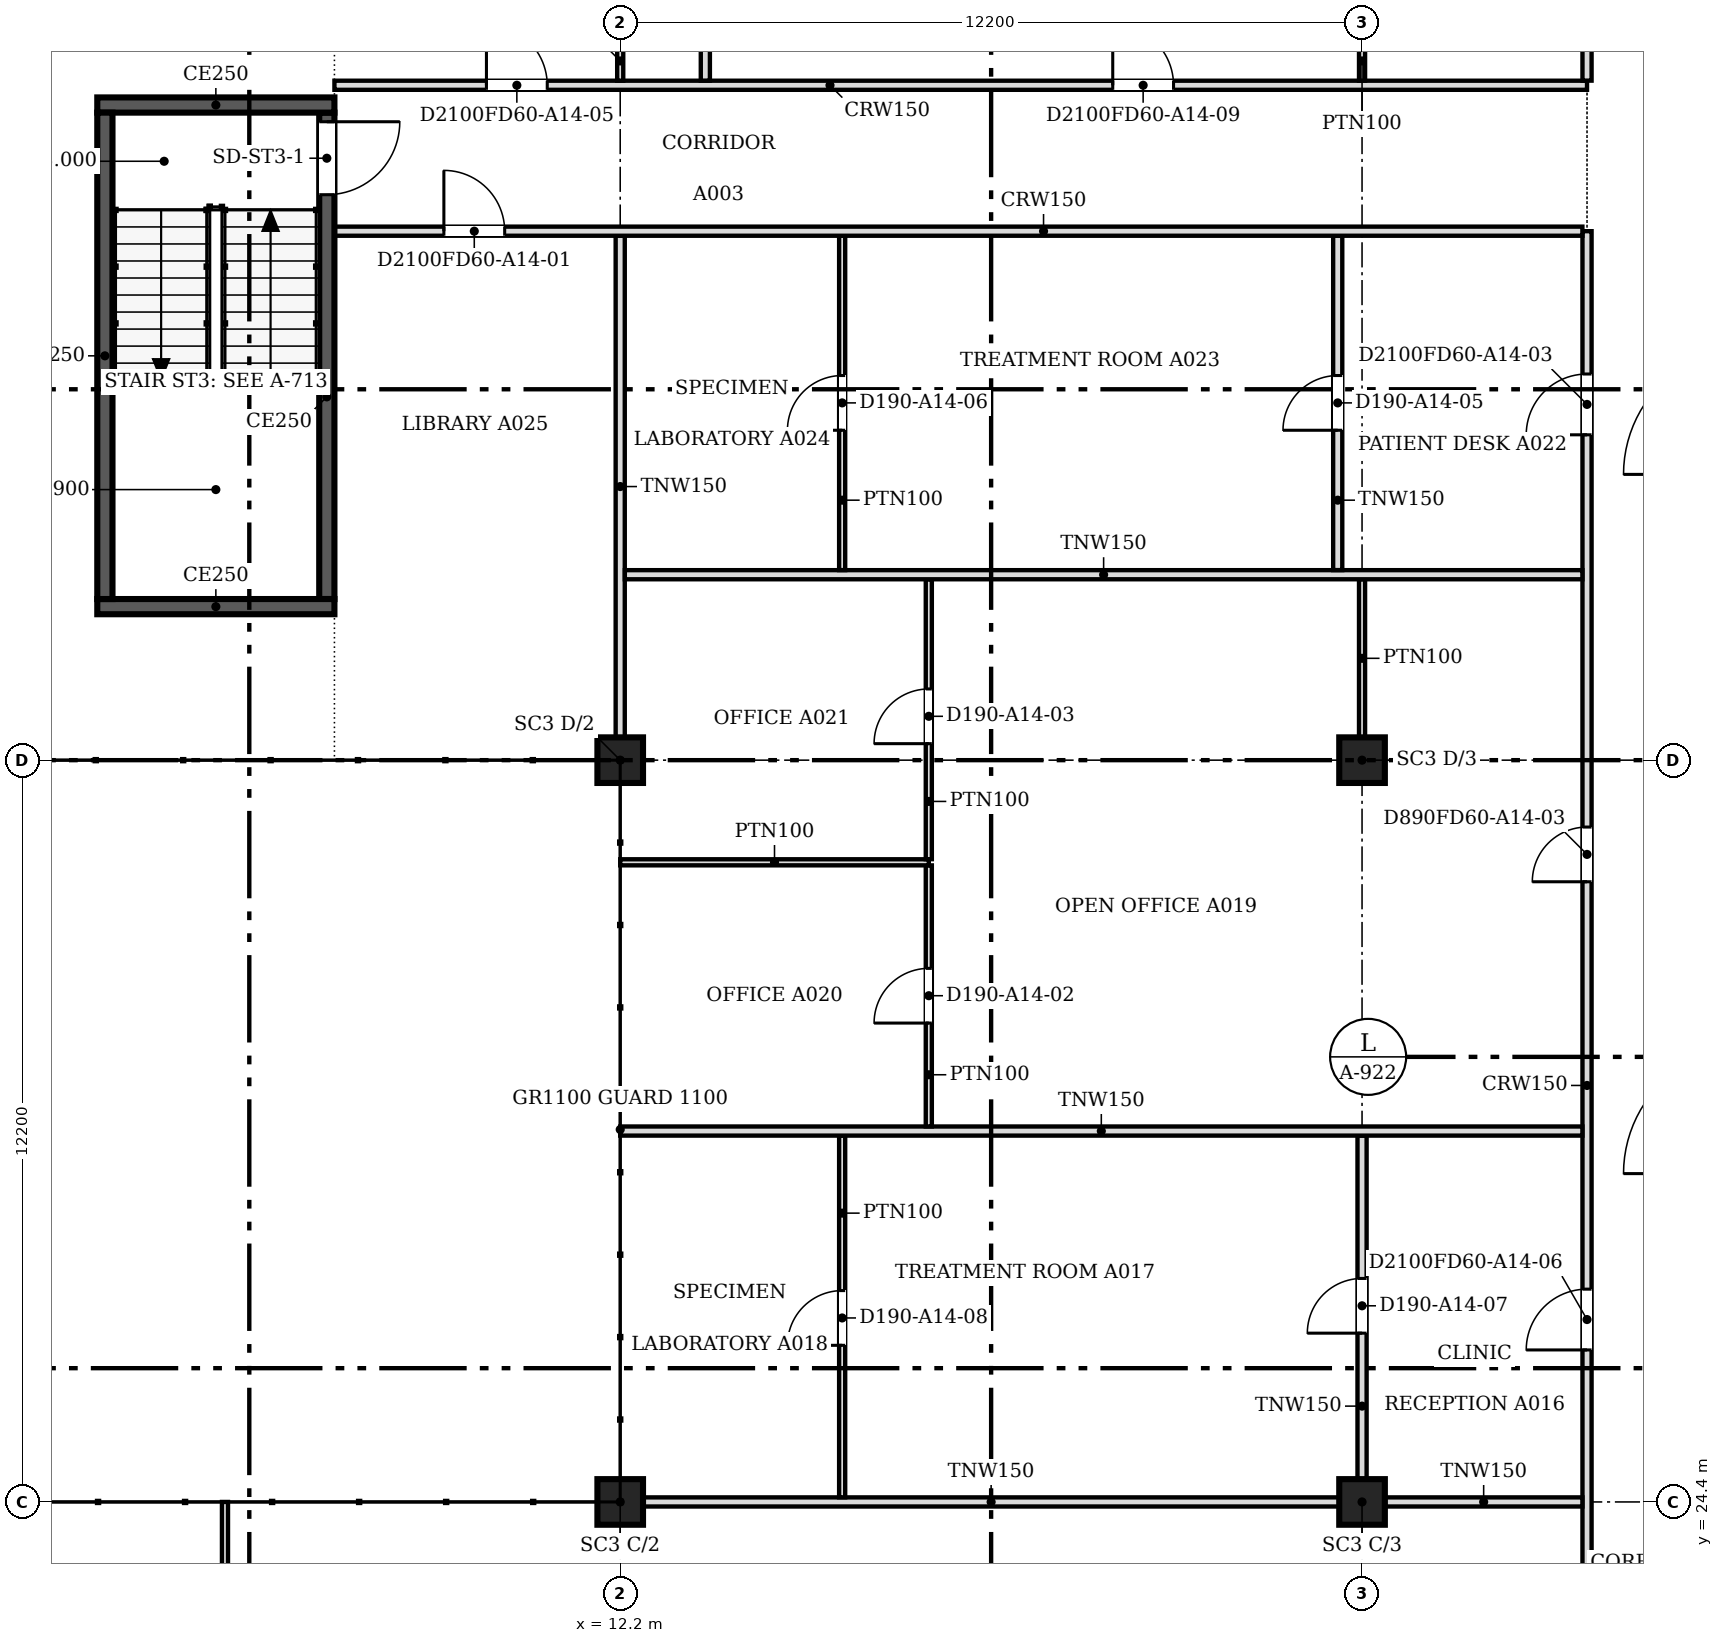
"""IFC4 building model, lengths in metres.
Left out: names, types, materials, properties, quantities, classifications, styles, units other than length and angle.
Written with IfcOpenShell. Run it as: python <this file> out.ifc"""

import sys

from ifc_helpers import new_model, si_unit, direction, frame, frame_2d, origin, origin_2d, place, context, subcontext, project, spatial, rectangle, extrude, source, transform, mapped, element, fill, save


model = new_model("IFC4")
c1 = context("Model", 3, precision=1e-05, world=origin(), true_north=direction((0.0, 1.0)))
c2 = subcontext(c1, "Body", "Model", "MODEL_VIEW")
j1 = project(units=[si_unit("LENGTHUNIT", "METRE"), si_unit("PLANEANGLEUNIT", "RADIAN")], contexts=[c1])
p1 = place(None, origin())
s1 = spatial("IfcSite", under=j1, at=p1, CompositionType="ELEMENT")
p2 = place(p1, origin())
s2 = spatial("IfcBuilding", under=s1, at=p2, CompositionType="ELEMENT")
p3 = place(p2, frame((0.0, 0.0, 159.2)))
s3 = spatial("IfcBuildingStorey", under=s2, at=p3, CompositionType="ELEMENT", Elevation=159.2)
for number, where, z_axis, x_axis in (
    (1, (12.2, 24.4, 0.0), (0.0, 0.0, 1.0), (1.0, 0.0, 0.0)),
    (2, (12.2, 36.6, 0.0), (0.0, 0.0, 1.0), (1.0, 0.0, 0.0)),
    (3, (24.4, 24.4, 0.0), (0.0, 0.0, 1.0), (1.0, 0.0, 0.0)),
    (4, (24.4, 36.6, 0.0), (0.0, 0.0, 1.0), (1.0, 0.0, 0.0)),
):
    element("IfcColumn", number, at=place(p3, frame(where, z_axis=z_axis, x_axis=x_axis)), inside=s3, PredefinedType="COLUMN", context=c2, shape_type="SweptSolid", body=[
        extrude(rectangle(XDim=0.75, YDim=0.75, at=origin_2d()), origin(), (0.0, 0.0, 1.0), 3.6),
    ])
p4 = place(p3, frame((7.5, 39.125, 0.0), z_axis=(0.0, 0.0, 1.0), x_axis=(-1.0, 0.0, 0.0)))
e5 = element("IfcWall", 5, at=p4, inside=s3, PredefinedType="SOLIDWALL", context=c2, shape_type="SweptSolid", body=[
    extrude(rectangle(XDim=3.9, YDim=0.25, at=frame_2d((1.95, 0.0))), origin(), (0.0, 0.0, 1.0), 3.8),
])
p5 = place(p3, frame((3.725, 39.25, 0.0), z_axis=(0.0, 0.0, 1.0), x_axis=(0.0, 1.0, 0.0)))
e6 = element("IfcWall", 6, at=p5, inside=s3, PredefinedType="SOLIDWALL", context=c2, shape_type="SweptSolid", body=[
    extrude(rectangle(XDim=8.0, YDim=0.25, at=frame_2d((4.0, 0.0))), origin(), (0.0, 0.0, 1.0), 3.8),
])
p6 = place(p3, frame((3.6, 47.375, 0.0), z_axis=(0.0, 0.0, 1.0), x_axis=(1.0, 0.0, 0.0)))
e7 = element("IfcWall", 7, at=p6, inside=s3, PredefinedType="SOLIDWALL", context=c2, shape_type="SweptSolid", body=[
    extrude(rectangle(XDim=3.9, YDim=0.25, at=frame_2d((1.95, 0.0))), origin(), (0.0, 0.0, 1.0), 3.8),
])
p7 = place(p3, frame((7.375, 47.25, 0.0), z_axis=(0.0, 0.0, 1.0), x_axis=(0.0, -1.0, 0.0)))
e8 = element("IfcWall", 8, at=p7, inside=s3, PredefinedType="SOLIDWALL", context=c2, shape_type="SweptSolid", body=[
    extrude(rectangle(XDim=8.0, YDim=0.25, at=frame_2d((4.0, 0.0))), origin(), (0.0, 0.0, 1.0), 3.8),
])
m1 = source(origin(), c2, "Body", "SweptSolid", [
    extrude(rectangle(XDim=1.2, YDim=2.1, at=frame_2d((0.6, 1.05))), frame((0.0, 0.135, 0.0), z_axis=(0.0, -1.0, 0.0), x_axis=(1.0, 0.0, 0.0)), (0.0, 0.0, 1.0), 0.27),
])
p8 = place(p7, frame((0.15, 0.0, 0.0)))
e9 = element("IfcOpeningElement", 9, at=p8, cuts=e8, PredefinedType="OPENING", context=c2, shape_type="MappedRepresentation", body=[
    mapped(m1, transform((0.0, 0.0, 0.0), scale=1.0)),
])
p9 = place(p3, frame((28.1, 18.8, 0.0), z_axis=(0.0, 0.0, 1.0), x_axis=(0.0, 1.0, 0.0)))
e10 = element("IfcWall", 10, at=p9, inside=s3, PredefinedType="PARTITIONING", context=c2, shape_type="SweptSolid", body=[
    extrude(rectangle(XDim=26.5, YDim=0.15, at=frame_2d((13.25, 0.0))), origin(), (0.0, 0.0, 1.0), 3.067),
])
m2 = source(origin(), c2, "Body", "SweptSolid", [
    extrude(rectangle(XDim=0.9, YDim=2.1, at=frame_2d((0.45, 1.05))), frame((0.0, 0.085, 0.0), z_axis=(0.0, -1.0, 0.0), x_axis=(1.0, 0.0, 0.0)), (0.0, 0.0, 1.0), 0.17),
])
p10 = place(p9, frame((1.1, 0.0, 0.0)))
e11 = element("IfcOpeningElement", 11, at=p10, cuts=e10, PredefinedType="OPENING", context=c2, shape_type="MappedRepresentation", body=[
    mapped(m2, transform((0.0, 0.0, 0.0), scale=1.0)),
])
m3 = source(origin(), c2, "Body", "SweptSolid", [
    extrude(rectangle(XDim=1.0, YDim=2.1, at=frame_2d((0.5, 1.05))), frame((0.0, 0.085, 0.0), z_axis=(0.0, -1.0, 0.0), x_axis=(1.0, 0.0, 0.0)), (0.0, 0.0, 1.0), 0.17),
])
p11 = place(p9, frame((23.151, 0.0, 0.0)))
e12 = element("IfcOpeningElement", 12, at=p11, cuts=e10, PredefinedType="OPENING", context=c2, shape_type="MappedRepresentation", body=[
    mapped(m3, transform((0.0, 0.0, 0.0), scale=1.0)),
])
p12 = place(p9, frame((8.1, 0.0, 0.0)))
e13 = element("IfcOpeningElement", 13, at=p12, cuts=e10, PredefinedType="OPENING", context=c2, shape_type="MappedRepresentation", body=[
    mapped(m3, transform((0.0, 0.0, 0.0), scale=1.0)),
])
p13 = place(p9, frame((15.8, 0.0, 0.0)))
e14 = element("IfcOpeningElement", 14, at=p13, cuts=e10, PredefinedType="OPENING", context=c2, shape_type="MappedRepresentation", body=[
    mapped(m2, transform((0.0, 0.0, 0.0), scale=1.0)),
])
p14 = place(p3, frame((5.7, 18.99, 0.0), z_axis=(0.0, 0.0, 1.0), x_axis=(0.0, 1.0, 0.0)))
e15 = element("IfcWall", 15, at=p14, inside=s3, PredefinedType="PARTITIONING", context=c2, shape_type="SweptSolid", body=[
    extrude(rectangle(XDim=5.41, YDim=0.1, at=frame_2d((2.705, 0.0))), origin(), (0.0, 0.0, 1.0), 3.067),
])
m4 = source(origin(), c2, "Body", "SweptSolid", [
    extrude(rectangle(XDim=0.9, YDim=2.1, at=frame_2d((0.45, 1.05))), frame((0.0, 0.06, 0.0), z_axis=(0.0, -1.0, 0.0), x_axis=(1.0, 0.0, 0.0)), (0.0, 0.0, 1.0), 0.12),
])
p15 = place(p14, frame((2.3, 0.0, 0.0)))
e16 = element("IfcOpeningElement", 16, at=p15, cuts=e15, PredefinedType="OPENING", context=c2, shape_type="MappedRepresentation", body=[
    mapped(m4, transform((0.0, 0.0, 0.0), scale=1.0)),
])
p16 = place(p3, frame((12.576, 24.4, 0.0), z_axis=(0.0, 0.0, 1.0), x_axis=(1.0, 0.0, 0.0)))
e17 = element("IfcWall", 17, at=p16, inside=s3, PredefinedType="PARTITIONING", context=c2, shape_type="SweptSolid", body=[
    extrude(rectangle(XDim=11.448, YDim=0.15, at=frame_2d((5.724, 0.0))), origin(), (0.0, 0.0, 1.0), 3.067),
])
p17 = place(p3, frame((24.776, 24.4, 0.0), z_axis=(0.0, 0.0, 1.0), x_axis=(1.0, 0.0, 0.0)))
e18 = element("IfcWall", 18, at=p17, inside=s3, PredefinedType="PARTITIONING", context=c2, shape_type="SweptSolid", body=[
    extrude(rectangle(XDim=3.248, YDim=0.15, at=frame_2d((1.624, 0.0))), origin(), (0.0, 0.0, 1.0), 3.067),
])
p18 = place(p3, frame((15.85, 24.476, 0.0), z_axis=(0.0, 0.0, 1.0), x_axis=(0.0, 1.0, 0.0)))
e19 = element("IfcWall", 19, at=p18, inside=s3, PredefinedType="PARTITIONING", context=c2, shape_type="SweptSolid", body=[
    extrude(rectangle(XDim=5.948, YDim=0.1, at=frame_2d((2.974, 0.0))), origin(), (0.0, 0.0, 1.0), 3.067),
])
p19 = place(p18, frame((2.5, 0.0, 0.0)))
e20 = element("IfcOpeningElement", 20, at=p19, cuts=e19, PredefinedType="OPENING", context=c2, shape_type="MappedRepresentation", body=[
    mapped(m4, transform((0.0, 0.0, 0.0), scale=1.0)),
])
p20 = place(p3, frame((24.4, 24.776, 0.0), z_axis=(0.0, 0.0, 1.0), x_axis=(0.0, 1.0, 0.0)))
e21 = element("IfcWall", 21, at=p20, inside=s3, PredefinedType="PARTITIONING", context=c2, shape_type="SweptSolid", body=[
    extrude(rectangle(XDim=5.648, YDim=0.15, at=frame_2d((2.824, 0.0))), origin(), (0.0, 0.0, 1.0), 3.067),
])
p21 = place(p20, frame((2.4, 0.0, 0.0)))
e22 = element("IfcOpeningElement", 22, at=p21, cuts=e21, PredefinedType="OPENING", context=c2, shape_type="MappedRepresentation", body=[
    mapped(m2, transform((0.0, 0.0, 0.0), scale=1.0)),
])
p22 = place(p3, frame((12.2, 30.5, 0.0), z_axis=(0.0, 0.0, 1.0), x_axis=(1.0, 0.0, 0.0)))
e23 = element("IfcWall", 23, at=p22, inside=s3, PredefinedType="PARTITIONING", context=c2, shape_type="SweptSolid", body=[
    extrude(rectangle(XDim=15.824, YDim=0.15, at=frame_2d((7.912, 0.0))), origin(), (0.0, 0.0, 1.0), 3.067),
])
p23 = place(p3, frame((17.275, 30.576, 0.0), z_axis=(0.0, 0.0, 1.0), x_axis=(0.0, 1.0, 0.0)))
e24 = element("IfcWall", 24, at=p23, inside=s3, PredefinedType="PARTITIONING", context=c2, shape_type="SweptSolid", body=[
    extrude(rectangle(XDim=4.293, YDim=0.1, at=frame_2d((2.147, 0.0))), origin(), (0.0, 0.0, 1.0), 3.067),
])
p24 = place(p23, frame((1.7, 0.0, 0.0)))
e25 = element("IfcOpeningElement", 25, at=p24, cuts=e24, PredefinedType="OPENING", context=c2, shape_type="MappedRepresentation", body=[
    mapped(m4, transform((0.0, 0.0, 0.0), scale=1.0)),
])
p25 = place(p3, frame((12.2, 34.92, 0.0), z_axis=(0.0, 0.0, 1.0), x_axis=(1.0, 0.0, 0.0)))
e26 = element("IfcWall", 26, at=p25, inside=s3, PredefinedType="PARTITIONING", context=c2, shape_type="SweptSolid", body=[
    extrude(rectangle(XDim=5.075, YDim=0.1, at=frame_2d((2.538, 0.0))), origin(), (0.0, 0.0, 1.0), 3.067),
])
p26 = place(p3, frame((17.275, 34.971, 0.0), z_axis=(0.0, 0.0, 1.0), x_axis=(0.0, 1.0, 0.0)))
e27 = element("IfcWall", 27, at=p26, inside=s3, PredefinedType="PARTITIONING", context=c2, shape_type="SweptSolid", body=[
    extrude(rectangle(XDim=4.603, YDim=0.1, at=frame_2d((2.301, 0.0))), origin(), (0.0, 0.0, 1.0), 3.067),
])
p27 = place(p26, frame((1.9, 0.0, 0.0)))
e28 = element("IfcOpeningElement", 28, at=p27, cuts=e27, PredefinedType="OPENING", context=c2, shape_type="MappedRepresentation", body=[
    mapped(m4, transform((0.0, 0.0, 0.0), scale=1.0)),
])
p28 = place(p3, frame((12.2, 36.976, 0.0), z_axis=(0.0, 0.0, 1.0), x_axis=(0.0, 1.0, 0.0)))
e29 = element("IfcWall", 29, at=p28, inside=s3, PredefinedType="PARTITIONING", context=c2, shape_type="SweptSolid", body=[
    extrude(rectangle(XDim=8.248, YDim=0.15, at=frame_2d((4.124, 0.0))), origin(), (0.0, 0.0, 1.0), 3.067),
])
p29 = place(p3, frame((24.4, 36.975, 0.0), z_axis=(0.0, 0.0, 1.0), x_axis=(0.0, 1.0, 0.0)))
e30 = element("IfcWall", 30, at=p29, inside=s3, PredefinedType="PARTITIONING", context=c2, shape_type="SweptSolid", body=[
    extrude(rectangle(XDim=2.6, YDim=0.1, at=frame_2d((1.3, 0.0))), origin(), (0.0, 0.0, 1.0), 3.067),
])
p30 = place(p3, frame((12.276, 39.65, 0.0), z_axis=(0.0, 0.0, 1.0), x_axis=(1.0, 0.0, 0.0)))
e31 = element("IfcWall", 31, at=p30, inside=s3, PredefinedType="PARTITIONING", context=c2, shape_type="SweptSolid", body=[
    extrude(rectangle(XDim=15.748, YDim=0.15, at=frame_2d((7.874, 0.0))), origin(), (0.0, 0.0, 1.0), 3.067),
])
p31 = place(p3, frame((15.85, 39.726, 0.0), z_axis=(0.0, 0.0, 1.0), x_axis=(0.0, 1.0, 0.0)))
e32 = element("IfcWall", 32, at=p31, inside=s3, PredefinedType="PARTITIONING", context=c2, shape_type="SweptSolid", body=[
    extrude(rectangle(XDim=5.498, YDim=0.1, at=frame_2d((2.749, 0.0))), origin(), (0.0, 0.0, 1.0), 3.067),
])
p32 = place(p31, frame((2.3, 0.0, 0.0)))
e33 = element("IfcOpeningElement", 33, at=p32, cuts=e32, PredefinedType="OPENING", context=c2, shape_type="MappedRepresentation", body=[
    mapped(m4, transform((0.0, 0.0, 0.0), scale=1.0)),
])
p33 = place(p3, frame((24.0, 39.726, 0.0), z_axis=(0.0, 0.0, 1.0), x_axis=(0.0, 1.0, 0.0)))
e34 = element("IfcWall", 34, at=p33, inside=s3, PredefinedType="PARTITIONING", context=c2, shape_type="SweptSolid", body=[
    extrude(rectangle(XDim=5.498, YDim=0.15, at=frame_2d((2.749, 0.0))), origin(), (0.0, 0.0, 1.0), 3.067),
])
p34 = place(p33, frame((2.3, 0.0, 0.0)))
e35 = element("IfcOpeningElement", 35, at=p34, cuts=e34, PredefinedType="OPENING", context=c2, shape_type="MappedRepresentation", body=[
    mapped(m2, transform((0.0, 0.0, 0.0), scale=1.0)),
])
p35 = place(p3, frame((28.024, 45.3, 0.0), z_axis=(0.0, 0.0, 1.0), x_axis=(-1.0, 0.0, 0.0)))
e36 = element("IfcWall", 36, at=p35, inside=s3, PredefinedType="PARTITIONING", context=c2, shape_type="SweptSolid", body=[
    extrude(rectangle(XDim=20.524, YDim=0.15, at=frame_2d((10.262, 0.0))), origin(), (0.0, 0.0, 1.0), 3.067),
])
p36 = place(p35, frame((17.724, 0.0, 0.0)))
e37 = element("IfcOpeningElement", 37, at=p36, cuts=e36, PredefinedType="OPENING", context=c2, shape_type="MappedRepresentation", body=[
    mapped(m3, transform((0.0, 0.0, 0.0), scale=1.0)),
])
p37 = place(p3, frame((7.5, 47.7, 0.0), z_axis=(0.0, 0.0, 1.0), x_axis=(1.0, 0.0, 0.0)))
e38 = element("IfcWall", 38, at=p37, inside=s3, PredefinedType="PARTITIONING", context=c2, shape_type="SweptSolid", body=[
    extrude(rectangle(XDim=20.6, YDim=0.15, at=frame_2d((10.3, 0.0))), origin(), (0.0, 0.0, 1.0), 3.067),
])
p38 = place(p37, frame((2.5, 0.0, 0.0)))
e39 = element("IfcOpeningElement", 39, at=p38, cuts=e38, PredefinedType="OPENING", context=c2, shape_type="MappedRepresentation", body=[
    mapped(m3, transform((0.0, 0.0, 0.0), scale=1.0)),
])
p39 = place(p37, frame((12.8, 0.0, 0.0)))
e40 = element("IfcOpeningElement", 40, at=p39, cuts=e38, PredefinedType="OPENING", context=c2, shape_type="MappedRepresentation", body=[
    mapped(m3, transform((0.0, 0.0, 0.0), scale=1.0)),
])
p40 = place(p3, frame((13.6, 47.776, 0.0), z_axis=(0.0, 0.0, 1.0), x_axis=(0.0, 1.0, 0.0)))
e41 = element("IfcWall", 41, at=p40, inside=s3, PredefinedType="PARTITIONING", context=c2, shape_type="SweptSolid", body=[
    extrude(rectangle(XDim=3.248, YDim=0.15, at=frame_2d((1.624, 0.0))), origin(), (0.0, 0.0, 1.0), 3.067),
])
p41 = place(p3, frame((28.1, 47.776, 0.0), z_axis=(0.0, 0.0, 1.0), x_axis=(0.0, 1.0, 0.0)))
e42 = element("IfcWall", 42, at=p41, inside=s3, PredefinedType="PARTITIONING", context=c2, shape_type="SweptSolid", body=[
    extrude(rectangle(XDim=3.324, YDim=0.15, at=frame_2d((1.662, 0.0))), origin(), (0.0, 0.0, 1.0), 3.067),
])
for number, where, z_axis, x_axis in (
    (43, (12.2, 48.425, 0.0), (0.0, 0.0, 1.0), (0.0, -1.0, 0.0)),
    (44, (24.4, 48.425, 0.0), (0.0, 0.0, 1.0), (0.0, -1.0, 0.0)),
):
    element("IfcWall", number, at=place(p3, frame(where, z_axis=z_axis, x_axis=x_axis)), inside=s3, PredefinedType="PARTITIONING", context=c2, shape_type="SweptSolid", body=[
        extrude(rectangle(XDim=0.65, YDim=0.1, at=frame_2d((0.325, 0.0))), origin(), (0.0, 0.0, 1.0), 3.067),
    ])
m5 = source(origin(), c2, "Body", "SweptSolid", [
    extrude(rectangle(XDim=1.2, YDim=2.1, at=frame_2d((0.6, 1.05))), frame((0.0, 0.025, 0.0), z_axis=(0.0, -1.0, 0.0), x_axis=(1.0, 0.0, 0.0)), (0.0, 0.0, 1.0), 0.05),
])
p42 = place(p8, origin())
e45 = element("IfcDoor", 45, at=p42, inside=s3, OperationType="SINGLE_SWING_LEFT", PredefinedType="DOOR", context=c2, shape_type="MappedRepresentation", body=[
    mapped(m5, transform((0.0, 0.0, 0.0), scale=1.0)),
])
fill(e9, e45)
m6 = source(origin(), c2, "Body", "SweptSolid", [
    extrude(rectangle(XDim=0.9, YDim=2.1, at=frame_2d((0.45, 1.05))), frame((0.0, 0.025, 0.0), z_axis=(0.0, -1.0, 0.0), x_axis=(1.0, 0.0, 0.0)), (0.0, 0.0, 1.0), 0.05),
])
p43 = place(p24, origin())
e46 = element("IfcDoor", 46, at=p43, inside=s3, OperationType="SINGLE_SWING_LEFT", PredefinedType="DOOR", context=c2, shape_type="MappedRepresentation", body=[
    mapped(m6, transform((0.0, 0.0, 0.0), scale=1.0)),
])
fill(e25, e46)
p44 = place(p27, origin())
e47 = element("IfcDoor", 47, at=p44, inside=s3, OperationType="SINGLE_SWING_LEFT", PredefinedType="DOOR", context=c2, shape_type="MappedRepresentation", body=[
    mapped(m6, transform((0.0, 0.0, 0.0), scale=1.0)),
])
fill(e28, e47)
m7 = source(origin(), c2, "Body", "SweptSolid", [
    extrude(rectangle(XDim=1.0, YDim=2.1, at=frame_2d((0.5, 1.05))), frame((0.0, 0.025, 0.0), z_axis=(0.0, -1.0, 0.0), x_axis=(1.0, 0.0, 0.0)), (0.0, 0.0, 1.0), 0.05),
])
p45 = place(p36, origin())
e48 = element("IfcDoor", 48, at=p45, inside=s3, OperationType="SINGLE_SWING_RIGHT", PredefinedType="DOOR", context=c2, shape_type="MappedRepresentation", body=[
    mapped(m7, transform((0.0, 0.0, 0.0), scale=1.0)),
])
fill(e37, e48)
p46 = place(p34, origin())
e49 = element("IfcDoor", 49, at=p46, inside=s3, OperationType="SINGLE_SWING_LEFT", PredefinedType="DOOR", context=c2, shape_type="MappedRepresentation", body=[
    mapped(m6, transform((0.0, 0.0, 0.0), scale=1.0)),
])
fill(e35, e49)
p47 = place(p32, origin())
e50 = element("IfcDoor", 50, at=p47, inside=s3, OperationType="SINGLE_SWING_LEFT", PredefinedType="DOOR", context=c2, shape_type="MappedRepresentation", body=[
    mapped(m6, transform((0.0, 0.0, 0.0), scale=1.0)),
])
fill(e33, e50)
p48 = place(p21, origin())
e51 = element("IfcDoor", 51, at=p48, inside=s3, OperationType="SINGLE_SWING_LEFT", PredefinedType="DOOR", context=c2, shape_type="MappedRepresentation", body=[
    mapped(m6, transform((0.0, 0.0, 0.0), scale=1.0)),
])
fill(e22, e51)
p49 = place(p11, origin())
e52 = element("IfcDoor", 52, at=p49, inside=s3, OperationType="SINGLE_SWING_LEFT", PredefinedType="DOOR", context=c2, shape_type="MappedRepresentation", body=[
    mapped(m7, transform((0.0, 0.0, 0.0), scale=1.0)),
])
fill(e12, e52)
p50 = place(p19, origin())
e53 = element("IfcDoor", 53, at=p50, inside=s3, OperationType="SINGLE_SWING_LEFT", PredefinedType="DOOR", context=c2, shape_type="MappedRepresentation", body=[
    mapped(m6, transform((0.0, 0.0, 0.0), scale=1.0)),
])
fill(e20, e53)
p51 = place(p38, origin())
e54 = element("IfcDoor", 54, at=p51, inside=s3, OperationType="SINGLE_SWING_LEFT", PredefinedType="DOOR", context=c2, shape_type="MappedRepresentation", body=[
    mapped(m7, transform((0.0, 0.0, 0.0), scale=1.0)),
])
fill(e39, e54)
p52 = place(p12, origin())
e55 = element("IfcDoor", 55, at=p52, inside=s3, OperationType="SINGLE_SWING_LEFT", PredefinedType="DOOR", context=c2, shape_type="MappedRepresentation", body=[
    mapped(m7, transform((0.0, 0.0, 0.0), scale=1.0)),
])
fill(e13, e55)
p53 = place(p13, origin())
e56 = element("IfcDoor", 56, at=p53, inside=s3, OperationType="SINGLE_SWING_LEFT", PredefinedType="DOOR", context=c2, shape_type="MappedRepresentation", body=[
    mapped(m6, transform((0.0, 0.0, 0.0), scale=1.0)),
])
fill(e14, e56)
p54 = place(p39, origin())
e57 = element("IfcDoor", 57, at=p54, inside=s3, OperationType="SINGLE_SWING_LEFT", PredefinedType="DOOR", context=c2, shape_type="MappedRepresentation", body=[
    mapped(m7, transform((0.0, 0.0, 0.0), scale=1.0)),
])
fill(e40, e57)
save(model, sys.argv[1])
